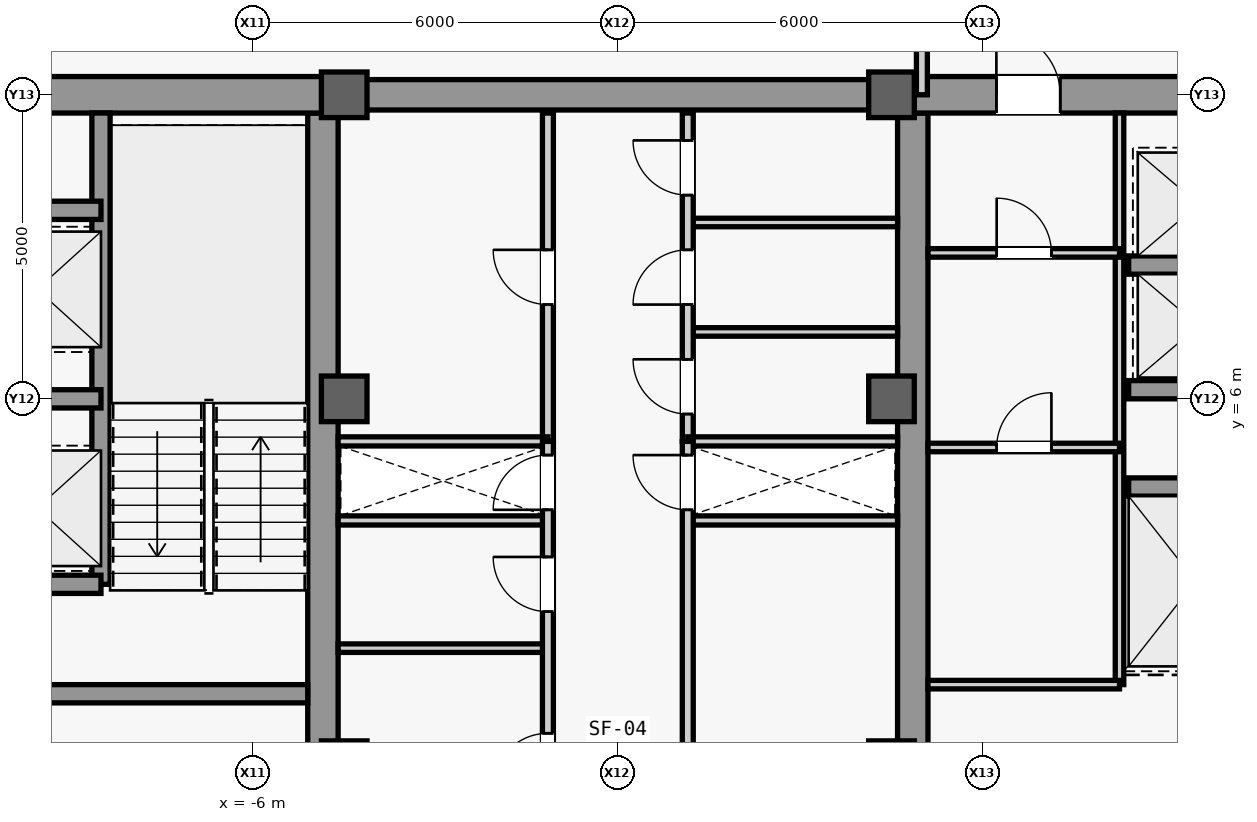
"""IFC4 building model, lengths in metres.
Left out: names, types, materials, properties, quantities, classifications, styles, units other than length and angle.
Written with IfcOpenShell. Run it as: python <this file> out.ifc"""

import sys

from ifc_helpers import new_model, si_unit, direction, frame, frame_2d, origin, origin_2d, place, context, subcontext, project, spatial, rectangle, extrude, source, transform, mapped, element, fill, save


model = new_model("IFC4")
c1 = context("Model", 3, precision=1e-05, world=origin(), true_north=direction((0.0, 1.0)))
c2 = subcontext(c1, "Body", "Model", "MODEL_VIEW")
j1 = project(units=[si_unit("LENGTHUNIT", "METRE"), si_unit("PLANEANGLEUNIT", "RADIAN")], contexts=[c1])
p1 = place(None, origin())
s1 = spatial("IfcSite", under=j1, at=p1, CompositionType="ELEMENT")
p2 = place(p1, origin())
s2 = spatial("IfcBuilding", under=s1, at=p2, CompositionType="ELEMENT")
p3 = place(p2, frame((0.0, 0.0, 301.5)))
s3 = spatial("IfcBuildingStorey", under=s2, at=p3, CompositionType="ELEMENT", Elevation=301.5)
m1 = source(origin(), c2, "Body", "SweptSolid", [
    extrude(rectangle(XDim=21.4, YDim=0.5, at=frame_2d((10.7, 0.0))), origin(), (0.0, 0.0, 1.0), 3.78),
])
for number, where, z_axis, x_axis in (
    (1, (-4.85, -10.7, 0.0), (0.0, 0.0, 1.0), (0.0, 1.0, 0.0)),
    (2, (4.85, -10.7, 0.0), (0.0, 0.0, 1.0), (0.0, 1.0, 0.0)),
):
    element("IfcWall", number, at=place(p3, frame(where, z_axis=z_axis, x_axis=x_axis)), inside=s3, PredefinedType="SHEAR", context=c2, shape_type="MappedRepresentation", body=[
        mapped(m1, transform((0.0, 0.0, 0.0), scale=1.0)),
    ])
m2 = source(origin(), c2, "Body", "SweptSolid", [
    extrude(rectangle(XDim=5.9, YDim=0.6, at=frame_2d((2.95, 0.0))), origin(), (0.0, 0.0, 1.0), 3.78),
])
p4 = place(p3, frame((-10.75, 11.0, 0.0), z_axis=(0.0, 0.0, 1.0), x_axis=(1.0, 0.0, 0.0)))
e3 = element("IfcWall", 3, at=p4, inside=s3, PredefinedType="SHEAR", context=c2, shape_type="MappedRepresentation", body=[
    mapped(m2, transform((0.0, 0.0, 0.0), scale=1.0)),
])
p5 = place(p3, frame((4.85, 11.0, 0.0), z_axis=(0.0, 0.0, 1.0), x_axis=(1.0, 0.0, 0.0)))
e4 = element("IfcWall", 4, at=p5, inside=s3, PredefinedType="SHEAR", context=c2, shape_type="MappedRepresentation", body=[
    mapped(m2, transform((0.0, 0.0, 0.0), scale=1.0)),
])
m3 = source(origin(), c2, "Body", "SweptSolid", [
    extrude(rectangle(XDim=1.05, YDim=2.2, at=frame_2d((0.525, 1.1))), frame((0.0, 0.31, 0.0), z_axis=(0.0, -1.0, 0.0), x_axis=(1.0, 0.0, 0.0)), (0.0, 0.0, 1.0), 0.62),
])
p6 = place(p5, frame((1.375, 0.0, 0.0)))
e5 = element("IfcOpeningElement", 5, at=p6, cuts=e4, PredefinedType="OPENING", context=c2, shape_type="MappedRepresentation", body=[
    mapped(m3, transform((0.0, 0.0, 0.0), scale=1.0)),
])
m4 = source(origin(), c2, "Body", "SweptSolid", [
    extrude(rectangle(XDim=5.65, YDim=0.3, at=frame_2d((2.825, 0.0))), origin(), (0.0, 0.0, 1.0), 3.78),
])
p7 = place(p3, frame((-10.75, 1.15, 0.0), z_axis=(0.0, 0.0, 1.0), x_axis=(1.0, 0.0, 0.0)))
e6 = element("IfcWall", 6, at=p7, inside=s3, PredefinedType="SHEAR", context=c2, shape_type="MappedRepresentation", body=[
    mapped(m4, transform((0.0, 0.0, 0.0), scale=1.0)),
])
m5 = source(origin(), c2, "Body", "SweptSolid", [
    extrude(rectangle(XDim=9.2, YDim=0.5, at=frame_2d((4.6, 0.0))), origin(), (0.0, 0.0, 1.0), 3.78),
])
p8 = place(p3, frame((-4.6, 11.0, 0.0), z_axis=(0.0, 0.0, 1.0), x_axis=(1.0, 0.0, 0.0)))
e7 = element("IfcWall", 7, at=p8, inside=s3, PredefinedType="SHEAR", context=c2, shape_type="MappedRepresentation", body=[
    mapped(m5, transform((0.0, 0.0, 0.0), scale=1.0)),
])
m6 = source(origin(), c2, "Body", "SweptSolid", [
    extrude(rectangle(XDim=0.75, YDim=0.75, at=origin_2d()), origin(), (0.0, 0.0, 1.0), 4.0),
])
for number, where, z_axis, x_axis in (
    (8, (-4.5, 0.0, 0.0), (0.0, 0.0, 1.0), (1.0, 0.0, 0.0)),
    (9, (-4.5, 6.0, 0.0), (0.0, 0.0, 1.0), (1.0, 0.0, 0.0)),
    (10, (-4.5, 11.0, 0.0), (0.0, 0.0, 1.0), (1.0, 0.0, 0.0)),
    (11, (4.5, 0.0, 0.0), (0.0, 0.0, 1.0), (1.0, 0.0, 0.0)),
    (12, (4.5, 6.0, 0.0), (0.0, 0.0, 1.0), (1.0, 0.0, 0.0)),
    (13, (4.5, 11.0, 0.0), (0.0, 0.0, 1.0), (1.0, 0.0, 0.0)),
):
    element("IfcColumn", number, at=place(p3, frame(where, z_axis=z_axis, x_axis=x_axis)), inside=s3, PredefinedType="COLUMN", context=c2, shape_type="MappedRepresentation", body=[
        mapped(m6, transform((0.0, 0.0, 0.0), scale=1.0)),
    ])
m7 = source(origin(), c2, "Body", "SweptSolid", [
    extrude(rectangle(XDim=7.75, YDim=0.3, at=frame_2d((3.875, 0.0))), origin(), (0.0, 0.0, 1.0), 3.78),
])
p9 = place(p3, frame((-8.5, 2.95, 0.0), z_axis=(0.0, 0.0, 1.0), x_axis=(0.0, 1.0, 0.0)))
e14 = element("IfcWall", 14, at=p9, inside=s3, PredefinedType="SHEAR", context=c2, shape_type="MappedRepresentation", body=[
    mapped(m7, transform((0.0, 0.0, 0.0), scale=1.0)),
])
m8 = source(origin(), c2, "Body", "SweptSolid", [
    extrude(rectangle(XDim=2.2, YDim=0.3, at=frame_2d((1.1, 0.0))), origin(), (0.0, 0.0, 1.0), 3.78),
])
for number, where, z_axis, x_axis in (
    (15, (-10.7, 2.95, 0.0), (0.0, 0.0, 1.0), (1.0, 0.0, 0.0)),
    (16, (-10.7, 6.0, 0.0), (0.0, 0.0, 1.0), (1.0, 0.0, 0.0)),
    (17, (-10.7, 9.1, 0.0), (0.0, 0.0, 1.0), (1.0, 0.0, 0.0)),
):
    element("IfcWall", number, at=place(p3, frame(where, z_axis=z_axis, x_axis=x_axis)), inside=s3, PredefinedType="SHEAR", context=c2, shape_type="MappedRepresentation", body=[
        mapped(m8, transform((0.0, 0.0, 0.0), scale=1.0)),
    ])
m9 = source(origin(), c2, "Body", "SweptSolid", [
    extrude(rectangle(XDim=2.3, YDim=0.3, at=frame_2d((1.15, 0.0))), origin(), (0.0, 0.0, 1.0), 3.78),
])
for number, where, z_axis, x_axis in (
    (18, (8.4, 4.55, 0.0), (0.0, 0.0, 1.0), (1.0, 0.0, 0.0)),
    (19, (8.4, 6.15, 0.0), (0.0, 0.0, 1.0), (1.0, 0.0, 0.0)),
    (20, (8.4, 8.2, 0.0), (0.0, 0.0, 1.0), (1.0, 0.0, 0.0)),
):
    element("IfcWall", number, at=place(p3, frame(where, z_axis=z_axis, x_axis=x_axis)), inside=s3, PredefinedType="SHEAR", context=c2, shape_type="MappedRepresentation", body=[
        mapped(m9, transform((0.0, 0.0, 0.0), scale=1.0)),
    ])
m10 = source(origin(), c2, "Body", "SweptSolid", [
    extrude(rectangle(XDim=9.4, YDim=0.14, at=frame_2d((4.7, 0.0))), origin(), (0.0, 0.0, 1.0), 3.78),
])
p10 = place(p3, frame((8.25, 1.3, 0.0), z_axis=(0.0, 0.0, 1.0), x_axis=(0.0, 1.0, 0.0)))
e21 = element("IfcWall", 21, at=p10, inside=s3, PredefinedType="PARTITIONING", context=c2, shape_type="MappedRepresentation", body=[
    mapped(m10, transform((0.0, 0.0, 0.0), scale=1.0)),
])
m11 = source(origin(), c2, "Body", "SweptSolid", [
    extrude(rectangle(XDim=3.15, YDim=0.14, at=frame_2d((1.575, 0.0))), origin(), (0.0, 0.0, 1.0), 3.78),
])
p11 = place(p3, frame((5.1, 1.3, 0.0), z_axis=(0.0, 0.0, 1.0), x_axis=(1.0, 0.0, 0.0)))
e22 = element("IfcWall", 22, at=p11, inside=s3, PredefinedType="PARTITIONING", context=c2, shape_type="MappedRepresentation", body=[
    mapped(m11, transform((0.0, 0.0, 0.0), scale=1.0)),
])
p12 = place(p3, frame((5.1, 8.4, 0.0), z_axis=(0.0, 0.0, 1.0), x_axis=(1.0, 0.0, 0.0)))
e23 = element("IfcWall", 23, at=p12, inside=s3, PredefinedType="PARTITIONING", context=c2, shape_type="MappedRepresentation", body=[
    mapped(m11, transform((0.0, 0.0, 0.0), scale=1.0)),
])
m12 = source(origin(), c2, "Body", "SweptSolid", [
    extrude(rectangle(XDim=0.9, YDim=2.15, at=frame_2d((0.45, 1.075))), frame((0.0, 0.08, 0.0), z_axis=(0.0, -1.0, 0.0), x_axis=(1.0, 0.0, 0.0)), (0.0, 0.0, 1.0), 0.16),
])
p13 = place(p12, frame((1.13, 0.0, 0.0)))
e24 = element("IfcOpeningElement", 24, at=p13, cuts=e23, PredefinedType="OPENING", context=c2, shape_type="MappedRepresentation", body=[
    mapped(m12, transform((0.0, 0.0, 0.0), scale=1.0)),
])
p14 = place(p3, frame((5.1, 5.2, 0.0), z_axis=(0.0, 0.0, 1.0), x_axis=(1.0, 0.0, 0.0)))
e25 = element("IfcWall", 25, at=p14, inside=s3, PredefinedType="PARTITIONING", context=c2, shape_type="MappedRepresentation", body=[
    mapped(m11, transform((0.0, 0.0, 0.0), scale=1.0)),
])
p15 = place(p14, frame((1.13, 0.0, 0.0)))
e26 = element("IfcOpeningElement", 26, at=p15, cuts=e25, PredefinedType="OPENING", context=c2, shape_type="MappedRepresentation", body=[
    mapped(m12, transform((0.0, 0.0, 0.0), scale=1.0)),
])
m13 = source(origin(), c2, "Body", "SweptSolid", [
    extrude(rectangle(XDim=3.45, YDim=0.15, at=frame_2d((1.725, 0.0))), origin(), (0.0, 0.0, 1.0), 3.78),
])
for number, where, z_axis, x_axis in (
    (27, (-4.6, 4.0, 0.0), (0.0, 0.0, 1.0), (1.0, 0.0, 0.0)),
    (28, (1.15, 4.0, 0.0), (0.0, 0.0, 1.0), (1.0, 0.0, 0.0)),
):
    element("IfcWall", number, at=place(p3, frame(where, z_axis=z_axis, x_axis=x_axis)), inside=s3, PredefinedType="PARTITIONING", context=c2, shape_type="MappedRepresentation", body=[
        mapped(m13, transform((0.0, 0.0, 0.0), scale=1.0)),
    ])
m14 = source(origin(), c2, "Body", "SweptSolid", [
    extrude(rectangle(XDim=5.4, YDim=0.18, at=frame_2d((2.7, 0.0))), origin(), (0.0, 0.0, 1.0), 3.78),
])
p16 = place(p3, frame((-1.15, 5.3, 0.0), z_axis=(0.0, 0.0, 1.0), x_axis=(0.0, 1.0, 0.0)))
e29 = element("IfcWall", 29, at=p16, inside=s3, PredefinedType="PARTITIONING", context=c2, shape_type="MappedRepresentation", body=[
    mapped(m14, transform((0.0, 0.0, 0.0), scale=1.0)),
])
m15 = source(origin(), c2, "Body", "SweptSolid", [
    extrude(rectangle(XDim=0.9, YDim=2.15, at=frame_2d((0.45, 1.075))), frame((0.0, 0.1, 0.0), z_axis=(0.0, -1.0, 0.0), x_axis=(1.0, 0.0, 0.0)), (0.0, 0.0, 1.0), 0.2),
])
p17 = place(p16, frame((2.25, 0.0, 0.0)))
e30 = element("IfcOpeningElement", 30, at=p17, cuts=e29, PredefinedType="OPENING", context=c2, shape_type="MappedRepresentation", body=[
    mapped(m15, transform((0.0, 0.0, 0.0), scale=1.0)),
])
m16 = source(origin(), c2, "Body", "SweptSolid", [
    extrude(rectangle(XDim=3.45, YDim=0.14, at=frame_2d((1.725, 0.0))), origin(), (0.0, 0.0, 1.0), 3.78),
])
for number, where, z_axis, x_axis in (
    (31, (1.15, 7.1, 0.0), (0.0, 0.0, 1.0), (1.0, 0.0, 0.0)),
    (32, (1.15, 8.9, 0.0), (0.0, 0.0, 1.0), (1.0, 0.0, 0.0)),
):
    element("IfcWall", number, at=place(p3, frame(where, z_axis=z_axis, x_axis=x_axis)), inside=s3, PredefinedType="PARTITIONING", context=c2, shape_type="MappedRepresentation", body=[
        mapped(m16, transform((0.0, 0.0, 0.0), scale=1.0)),
    ])
p18 = place(p3, frame((1.15, 5.3, 0.0), z_axis=(0.0, 0.0, 1.0), x_axis=(0.0, 1.0, 0.0)))
e33 = element("IfcWall", 33, at=p18, inside=s3, PredefinedType="PARTITIONING", context=c2, shape_type="MappedRepresentation", body=[
    mapped(m14, transform((0.0, 0.0, 0.0), scale=1.0)),
])
p19 = place(p18, frame((0.45, 0.0, 0.0)))
e34 = element("IfcOpeningElement", 34, at=p19, cuts=e33, PredefinedType="OPENING", context=c2, shape_type="MappedRepresentation", body=[
    mapped(m15, transform((0.0, 0.0, 0.0), scale=1.0)),
])
p20 = place(p18, frame((2.25, 0.0, 0.0)))
e35 = element("IfcOpeningElement", 35, at=p20, cuts=e33, PredefinedType="OPENING", context=c2, shape_type="MappedRepresentation", body=[
    mapped(m15, transform((0.0, 0.0, 0.0), scale=1.0)),
])
p21 = place(p18, frame((4.05, 0.0, 0.0)))
e36 = element("IfcOpeningElement", 36, at=p21, cuts=e33, PredefinedType="OPENING", context=c2, shape_type="MappedRepresentation", body=[
    mapped(m15, transform((0.0, 0.0, 0.0), scale=1.0)),
])
for number, where, z_axis, x_axis in (
    (37, (-4.6, 5.3, 0.0), (0.0, 0.0, 1.0), (1.0, 0.0, 0.0)),
    (38, (1.15, 5.3, 0.0), (0.0, 0.0, 1.0), (1.0, 0.0, 0.0)),
):
    element("IfcWall", number, at=place(p3, frame(where, z_axis=z_axis, x_axis=x_axis)), inside=s3, PredefinedType="PARTITIONING", context=c2, shape_type="MappedRepresentation", body=[
        mapped(m13, transform((0.0, 0.0, 0.0), scale=1.0)),
    ])
p22 = place(p3, frame((-4.6, 1.9, 0.0), z_axis=(0.0, 0.0, 1.0), x_axis=(1.0, 0.0, 0.0)))
e39 = element("IfcWall", 39, at=p22, inside=s3, PredefinedType="PARTITIONING", context=c2, shape_type="MappedRepresentation", body=[
    mapped(m16, transform((0.0, 0.0, 0.0), scale=1.0)),
])
m17 = source(origin(), c2, "Body", "SweptSolid", [
    extrude(rectangle(XDim=10.6, YDim=0.18, at=frame_2d((5.3, 0.0))), origin(), (0.0, 0.0, 1.0), 3.78),
])
p23 = place(p3, frame((-1.15, -5.3, 0.0), z_axis=(0.0, 0.0, 1.0), x_axis=(0.0, 1.0, 0.0)))
e40 = element("IfcWall", 40, at=p23, inside=s3, PredefinedType="PARTITIONING", context=c2, shape_type="MappedRepresentation", body=[
    mapped(m17, transform((0.0, 0.0, 0.0), scale=1.0)),
])
p24 = place(p23, frame((1.3, 0.0, 0.0)))
e41 = element("IfcOpeningElement", 41, at=p24, cuts=e40, PredefinedType="OPENING", context=c2, shape_type="MappedRepresentation", body=[
    mapped(m15, transform((0.0, 0.0, 0.0), scale=1.0)),
])
p25 = place(p23, frame((4.9, 0.0, 0.0)))
e42 = element("IfcOpeningElement", 42, at=p25, cuts=e40, PredefinedType="OPENING", context=c2, shape_type="MappedRepresentation", body=[
    mapped(m15, transform((0.0, 0.0, 0.0), scale=1.0)),
])
p26 = place(p23, frame((7.8, 0.0, 0.0)))
e43 = element("IfcOpeningElement", 43, at=p26, cuts=e40, PredefinedType="OPENING", context=c2, shape_type="MappedRepresentation", body=[
    mapped(m15, transform((0.0, 0.0, 0.0), scale=1.0)),
])
p27 = place(p23, frame((9.475, 0.0, 0.0)))
e44 = element("IfcOpeningElement", 44, at=p27, cuts=e40, PredefinedType="OPENING", context=c2, shape_type="MappedRepresentation", body=[
    mapped(m15, transform((0.0, 0.0, 0.0), scale=1.0)),
])
p28 = place(p3, frame((1.15, -5.3, 0.0), z_axis=(0.0, 0.0, 1.0), x_axis=(0.0, 1.0, 0.0)))
e45 = element("IfcWall", 45, at=p28, inside=s3, PredefinedType="PARTITIONING", context=c2, shape_type="MappedRepresentation", body=[
    mapped(m17, transform((0.0, 0.0, 0.0), scale=1.0)),
])
p29 = place(p28, frame((4.2, 0.0, 0.0)))
e46 = element("IfcOpeningElement", 46, at=p29, cuts=e45, PredefinedType="OPENING", context=c2, shape_type="MappedRepresentation", body=[
    mapped(m15, transform((0.0, 0.0, 0.0), scale=1.0)),
])
p30 = place(p28, frame((9.475, 0.0, 0.0)))
e47 = element("IfcOpeningElement", 47, at=p30, cuts=e45, PredefinedType="OPENING", context=c2, shape_type="MappedRepresentation", body=[
    mapped(m15, transform((0.0, 0.0, 0.0), scale=1.0)),
])
m18 = source(origin(), c2, "Body", "SweptSolid", [
    extrude(rectangle(XDim=2.6, YDim=0.18, at=frame_2d((1.3, 0.0))), origin(), (0.0, 0.0, 1.0), 3.78),
])
p31 = place(p3, frame((5.0, 11.0, 0.0), z_axis=(0.0, 0.0, 1.0), x_axis=(0.0, 1.0, 0.0)))
e48 = element("IfcWall", 48, at=p31, inside=s3, PredefinedType="PARTITIONING", context=c2, shape_type="MappedRepresentation", body=[
    mapped(m18, transform((0.0, 0.0, 0.0), scale=1.0)),
])
p32 = place(p31, frame((0.85, 0.0, 0.0)))
e49 = element("IfcOpeningElement", 49, at=p32, cuts=e48, PredefinedType="OPENING", context=c2, shape_type="MappedRepresentation", body=[
    mapped(m15, transform((0.0, 0.0, 0.0), scale=1.0)),
])
m19 = source(origin(), c2, "Body", "SweptSolid", [
    extrude(rectangle(XDim=1.05, YDim=2.2, at=frame_2d((0.525, 1.1))), frame((0.0, 0.025, 0.0), z_axis=(0.0, -1.0, 0.0), x_axis=(1.0, 0.0, 0.0)), (0.0, 0.0, 1.0), 0.05),
])
p33 = place(p6, origin())
e50 = element("IfcDoor", 50, at=p33, inside=s3, OperationType="SINGLE_SWING_LEFT", PredefinedType="DOOR", context=c2, shape_type="MappedRepresentation", body=[
    mapped(m19, transform((0.0, 0.0, 0.0), scale=1.0)),
])
fill(e5, e50)
m20 = source(origin(), c2, "Body", "SweptSolid", [
    extrude(rectangle(XDim=0.9, YDim=2.15, at=frame_2d((0.45, 1.075))), frame((0.0, 0.025, 0.0), z_axis=(0.0, -1.0, 0.0), x_axis=(1.0, 0.0, 0.0)), (0.0, 0.0, 1.0), 0.05),
])
p34 = place(p13, origin())
e51 = element("IfcDoor", 51, at=p34, inside=s3, OperationType="SINGLE_SWING_LEFT", PredefinedType="DOOR", context=c2, shape_type="MappedRepresentation", body=[
    mapped(m20, transform((0.0, 0.0, 0.0), scale=1.0)),
])
fill(e24, e51)
p35 = place(p15, origin())
e52 = element("IfcDoor", 52, at=p35, inside=s3, OperationType="SINGLE_SWING_RIGHT", PredefinedType="DOOR", context=c2, shape_type="MappedRepresentation", body=[
    mapped(m20, transform((0.0, 0.0, 0.0), scale=1.0)),
])
fill(e26, e52)
p36 = place(p17, origin())
e53 = element("IfcDoor", 53, at=p36, inside=s3, OperationType="SINGLE_SWING_RIGHT", PredefinedType="DOOR", context=c2, shape_type="MappedRepresentation", body=[
    mapped(m20, transform((0.0, 0.0, 0.0), scale=1.0)),
])
fill(e30, e53)
p37 = place(p19, origin())
e54 = element("IfcDoor", 54, at=p37, inside=s3, OperationType="SINGLE_SWING_RIGHT", PredefinedType="DOOR", context=c2, shape_type="MappedRepresentation", body=[
    mapped(m20, transform((0.0, 0.0, 0.0), scale=1.0)),
])
fill(e34, e54)
p38 = place(p20, origin())
e55 = element("IfcDoor", 55, at=p38, inside=s3, OperationType="SINGLE_SWING_LEFT", PredefinedType="DOOR", context=c2, shape_type="MappedRepresentation", body=[
    mapped(m20, transform((0.0, 0.0, 0.0), scale=1.0)),
])
fill(e35, e55)
p39 = place(p21, origin())
e56 = element("IfcDoor", 56, at=p39, inside=s3, OperationType="SINGLE_SWING_RIGHT", PredefinedType="DOOR", context=c2, shape_type="MappedRepresentation", body=[
    mapped(m20, transform((0.0, 0.0, 0.0), scale=1.0)),
])
fill(e36, e56)
p40 = place(p25, origin())
e57 = element("IfcDoor", 57, at=p40, inside=s3, OperationType="SINGLE_SWING_LEFT", PredefinedType="DOOR", context=c2, shape_type="MappedRepresentation", body=[
    mapped(m20, transform((0.0, 0.0, 0.0), scale=1.0)),
])
fill(e42, e57)
p41 = place(p26, origin())
e58 = element("IfcDoor", 58, at=p41, inside=s3, OperationType="SINGLE_SWING_RIGHT", PredefinedType="DOOR", context=c2, shape_type="MappedRepresentation", body=[
    mapped(m20, transform((0.0, 0.0, 0.0), scale=1.0)),
])
fill(e43, e58)
p42 = place(p27, origin())
e59 = element("IfcDoor", 59, at=p42, inside=s3, OperationType="SINGLE_SWING_LEFT", PredefinedType="DOOR", context=c2, shape_type="MappedRepresentation", body=[
    mapped(m20, transform((0.0, 0.0, 0.0), scale=1.0)),
])
fill(e44, e59)
p43 = place(p30, origin())
e60 = element("IfcDoor", 60, at=p43, inside=s3, OperationType="SINGLE_SWING_RIGHT", PredefinedType="DOOR", context=c2, shape_type="MappedRepresentation", body=[
    mapped(m20, transform((0.0, 0.0, 0.0), scale=1.0)),
])
fill(e47, e60)
save(model, sys.argv[1])
